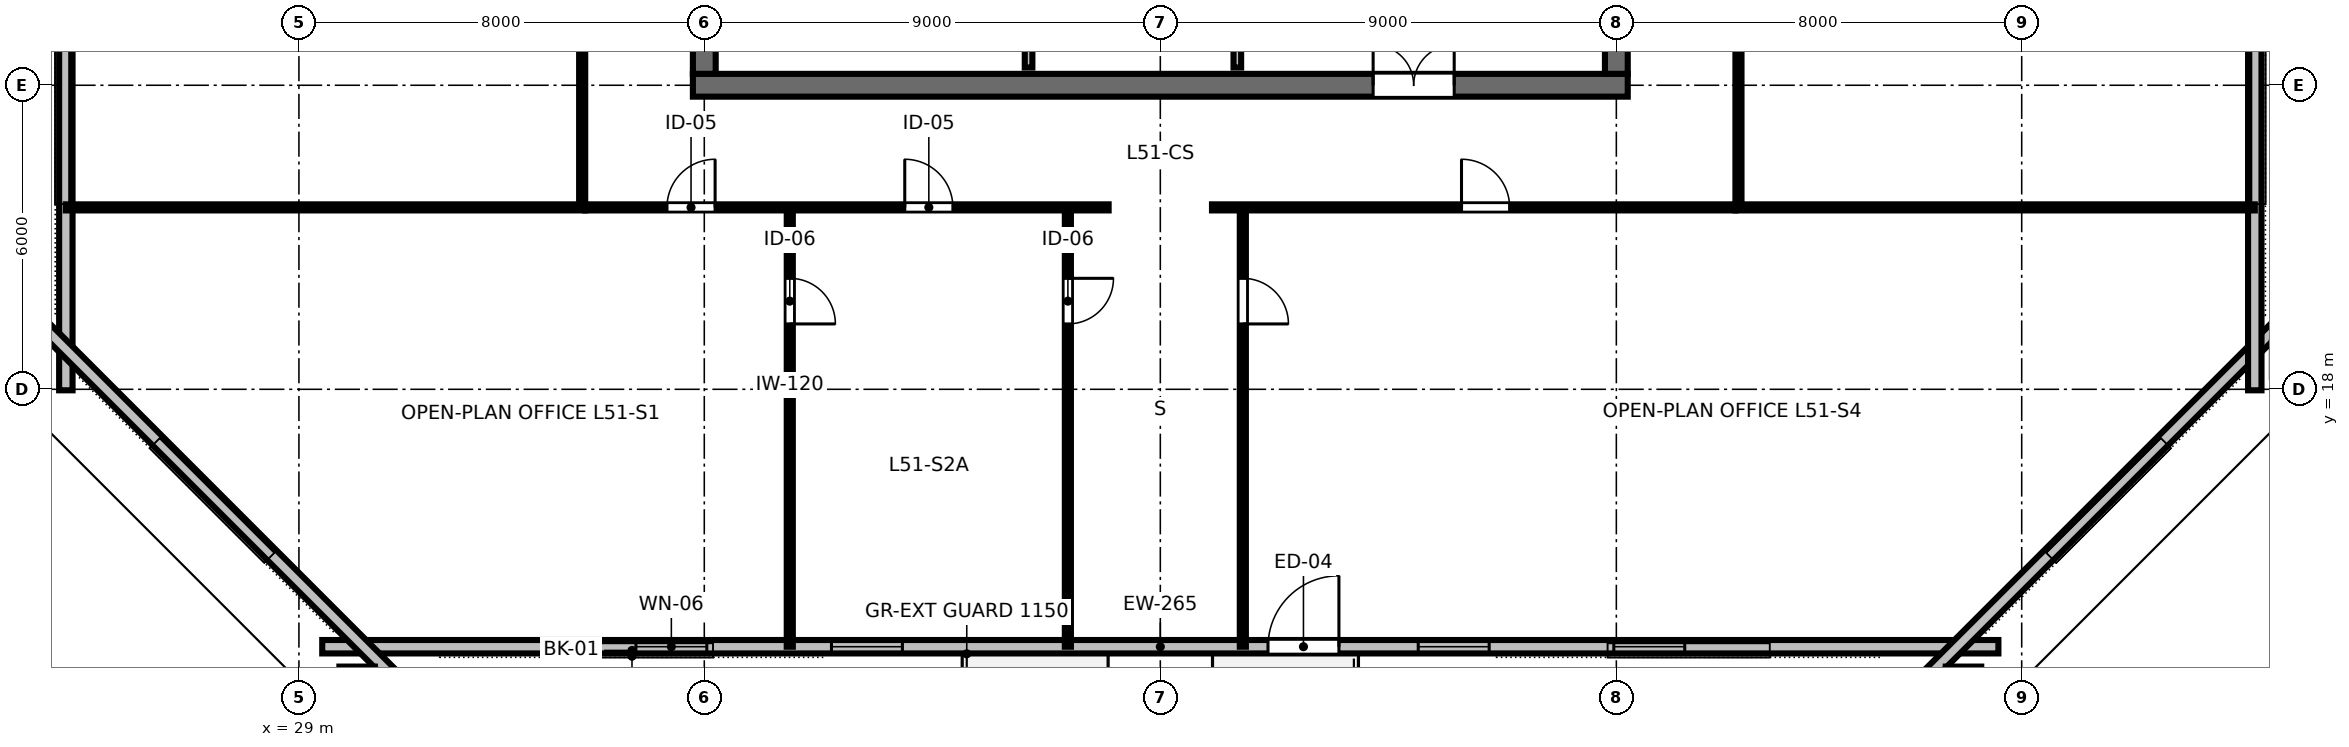
"""IFC4 building model, lengths in metres.
Left out: names, types, materials, properties, quantities, classifications, styles, units other than length and angle.
Written with IfcOpenShell. Run it as: python <this file> out.ifc"""

import sys

from ifc_helpers import new_model, si_unit, direction, frame, frame_2d, origin, origin_2d, place, context, subcontext, project, spatial, rectangle, hollow_rectangle, i_section, extrude, element, fill, save


model = new_model("IFC4")
c1 = context("Model", 3, precision=1e-05, world=origin(), true_north=direction((0.0, 1.0)))
c2 = subcontext(c1, "Body", "Model", "MODEL_VIEW")
j1 = project(units=[si_unit("LENGTHUNIT", "METRE"), si_unit("PLANEANGLEUNIT", "RADIAN")], contexts=[c1])
p1 = place(None, origin())
s1 = spatial("IfcSite", under=j1, at=p1, CompositionType="ELEMENT")
p2 = place(p1, origin())
s2 = spatial("IfcBuilding", under=s1, at=p2, CompositionType="ELEMENT")
p3 = place(p2, frame((0.0, 0.0, 195.0)))
s3 = spatial("IfcBuildingStorey", under=s2, at=p3, CompositionType="ELEMENT", Elevation=195.0)
p4 = place(p3, frame((36.775, 24.0, 0.0), z_axis=(0.0, 0.0, 1.0), x_axis=(1.0, 0.0, 0.0)))
e1 = element("IfcWall", 1, at=p4, inside=s3, PredefinedType="SHEAR", context=c2, shape_type="SweptSolid", body=[
    extrude(rectangle(XDim=18.45, YDim=0.45, at=frame_2d((9.225, 0.0))), origin(), (0.0, 0.0, 1.0), 3.36),
])
p5 = place(p4, frame((13.425, 0.0, 0.0)))
e2 = element("IfcOpeningElement", 2, at=p5, cuts=e1, PredefinedType="OPENING", context=c2, shape_type="SweptSolid", body=[
    extrude(rectangle(XDim=1.6, YDim=2.15, at=frame_2d((0.8, 1.075))), frame((0.0, 0.235, 0.0), z_axis=(0.0, -1.0, 0.0), x_axis=(1.0, 0.0, 0.0)), (0.0, 0.0, 1.0), 0.47),
])
p6 = place(p3, frame((37.0, 24.225, 0.0), z_axis=(0.0, 0.0, 1.0), x_axis=(0.0, 1.0, 0.0)))
e3 = element("IfcWall", 3, at=p6, inside=s3, PredefinedType="SHEAR", context=c2, shape_type="SweptSolid", body=[
    extrude(rectangle(XDim=15.55, YDim=0.45, at=frame_2d((7.775, 0.0))), origin(), (0.0, 0.0, 1.0), 3.36),
])
p7 = place(p6, frame((5.3, 0.0, 0.0)))
e4 = element("IfcOpeningElement", 4, at=p7, cuts=e3, PredefinedType="OPENING", context=c2, shape_type="SweptSolid", body=[
    extrude(rectangle(XDim=1.15, YDim=2.15, at=frame_2d((0.575, 1.075))), frame((0.0, 0.235, 0.0), z_axis=(0.0, -1.0, 0.0), x_axis=(1.0, 0.0, 0.0)), (0.0, 0.0, 1.0), 0.47),
])
p8 = place(p3, frame((55.0, 24.225, 0.0), z_axis=(0.0, 0.0, 1.0), x_axis=(0.0, 1.0, 0.0)))
e5 = element("IfcWall", 5, at=p8, inside=s3, PredefinedType="SHEAR", context=c2, shape_type="SweptSolid", body=[
    extrude(rectangle(XDim=15.55, YDim=0.45, at=frame_2d((7.775, 0.0))), origin(), (0.0, 0.0, 1.0), 3.36),
])
p9 = place(p8, frame((5.3, 0.0, 0.0)))
e6 = element("IfcOpeningElement", 6, at=p9, cuts=e5, PredefinedType="OPENING", context=c2, shape_type="SweptSolid", body=[
    extrude(rectangle(XDim=1.15, YDim=2.15, at=frame_2d((0.575, 1.075))), frame((0.0, 0.235, 0.0), z_axis=(0.0, -1.0, 0.0), x_axis=(1.0, 0.0, 0.0)), (0.0, 0.0, 1.0), 0.47),
])
p10 = place(p3, frame((30.149, 12.103, 0.0), z_axis=(0.251481665301, 0.187288203866, 0.949568376006), x_axis=(-0.597296145547, 0.802020769379, 0.0)))
e7 = element("IfcColumn", 7, at=p10, inside=s3, PredefinedType="COLUMN", context=c2, shape_type="SweptSolid", body=[
    extrude(hollow_rectangle(XDim=0.7, YDim=0.85, WallThickness=0.04, at=origin_2d()), origin(), (0.0, 0.0, 1.0), 3.552),
])
p11 = place(p3, frame((46.0, 12.26, 0.0), z_axis=(0.0, 0.192002682774, 0.981394400742), x_axis=(-1.0, 0.0, 0.0)))
e8 = element("IfcColumn", 8, at=p11, inside=s3, PredefinedType="COLUMN", context=c2, shape_type="SweptSolid", body=[
    extrude(i_section(OverallWidth=0.401, OverallDepth=0.399, WebThickness=0.025, FlangeThickness=0.04, FilletRadius=0.025, at=origin_2d()), origin(), (0.0, 0.0, 1.0), 3.437),
])
p12 = place(p3, frame((61.851, 12.103, 0.0), z_axis=(-0.251481665301, 0.187288203866, 0.949568376006), x_axis=(-0.597296145547, -0.802020769379, 0.0)))
e9 = element("IfcColumn", 9, at=p12, inside=s3, PredefinedType="COLUMN", context=c2, shape_type="SweptSolid", body=[
    extrude(hollow_rectangle(XDim=0.7, YDim=0.85, WallThickness=0.04, at=origin_2d()), origin(), (0.0, 0.0, 1.0), 3.552),
])
for number, where, z_axis, x_axis in (
    (10, (68.363, 18.59, 0.0), (-0.221, 0.218, 0.951), (0.677, -0.668, 0.31)),
    (11, (23.637, 18.59, 0.0), (0.221, 0.218, 0.951), (-0.677, -0.668, 0.31)),
):
    element("IfcColumn", number, at=place(p3, frame(where, z_axis=z_axis, x_axis=x_axis)), inside=s3, PredefinedType="COLUMN", context=c2, shape_type="SweptSolid", body=[
        extrude(hollow_rectangle(XDim=0.7, YDim=0.85, WallThickness=0.04, at=origin_2d()), origin(), (0.0, 0.0, 1.0), 3.548),
    ])
p13 = place(p3, frame((29.46, 12.92, 0.0), z_axis=(0.0, 0.0, 1.0), x_axis=(1.0, 0.0, 0.0)))
e12 = element("IfcWall", 12, at=p13, inside=s3, PredefinedType="STANDARD", context=c2, shape_type="SweptSolid", body=[
    extrude(rectangle(XDim=33.08, YDim=0.265, at=frame_2d((16.54, 0.0))), origin(), (0.0, 0.0, 1.0), 2.832),
])
p14 = place(p13, frame((18.665, 0.0, 0.0)))
e13 = element("IfcOpeningElement", 13, at=p14, cuts=e12, PredefinedType="OPENING", context=c2, shape_type="SweptSolid", body=[
    extrude(rectangle(XDim=1.4, YDim=2.15, at=frame_2d((0.7, 1.075))), frame((0.0, 0.142, 0.0), z_axis=(0.0, -1.0, 0.0), x_axis=(1.0, 0.0, 0.0)), (0.0, 0.0, 1.0), 0.285),
])
p15 = place(p13, frame((6.19, 0.0, 0.85)))
e14 = element("IfcOpeningElement", 14, at=p15, cuts=e12, PredefinedType="OPENING", context=c2, shape_type="SweptSolid", body=[
    extrude(rectangle(XDim=1.4, YDim=1.2, at=frame_2d((0.7, 0.6))), frame((0.0, 0.142, 0.0), z_axis=(0.0, -1.0, 0.0), x_axis=(1.0, 0.0, 0.0)), (0.0, 0.0, 1.0), 0.285),
])
p16 = place(p13, frame((10.05, 0.0, 0.85)))
e15 = element("IfcOpeningElement", 15, at=p16, cuts=e12, PredefinedType="OPENING", context=c2, shape_type="SweptSolid", body=[
    extrude(rectangle(XDim=1.4, YDim=1.2, at=frame_2d((0.7, 0.6))), frame((0.0, 0.142, 0.0), z_axis=(0.0, -1.0, 0.0), x_axis=(1.0, 0.0, 0.0)), (0.0, 0.0, 1.0), 0.285),
])
p17 = place(p13, frame((21.63, 0.0, 0.85)))
e16 = element("IfcOpeningElement", 16, at=p17, cuts=e12, PredefinedType="OPENING", context=c2, shape_type="SweptSolid", body=[
    extrude(rectangle(XDim=1.4, YDim=1.2, at=frame_2d((0.7, 0.6))), frame((0.0, 0.142, 0.0), z_axis=(0.0, -1.0, 0.0), x_axis=(1.0, 0.0, 0.0)), (0.0, 0.0, 1.0), 0.285),
])
p18 = place(p13, frame((25.49, 0.0, 0.85)))
e17 = element("IfcOpeningElement", 17, at=p18, cuts=e12, PredefinedType="OPENING", context=c2, shape_type="SweptSolid", body=[
    extrude(rectangle(XDim=1.4, YDim=1.2, at=frame_2d((0.7, 0.6))), frame((0.0, 0.142, 0.0), z_axis=(0.0, -1.0, 0.0), x_axis=(1.0, 0.0, 0.0)), (0.0, 0.0, 1.0), 0.285),
])
p19 = place(p3, frame((61.155, 12.346, 0.0), z_axis=(0.0, 0.0, 1.0), x_axis=(0.707106781187, 0.707106781187, 0.0)))
e18 = element("IfcWall", 18, at=p19, inside=s3, PredefinedType="STANDARD", context=c2, shape_type="SweptSolid", body=[
    extrude(rectangle(XDim=9.927, YDim=0.265, at=frame_2d((4.963, 0.0))), origin(), (0.0, 0.0, 1.0), 3.375),
])
for number, where, z_axis, x_axis in (
    (19, (67.6, 17.98, 0.0), (0.0, 0.0, 1.0), (0.0, 1.0, 0.0)),
    (20, (24.4, 46.02, 0.0), (0.0, 0.0, 1.0), (0.0, -1.0, 0.0)),
):
    element("IfcWall", number, at=place(p3, frame(where, z_axis=z_axis, x_axis=x_axis)), inside=s3, PredefinedType="STANDARD", context=c2, shape_type="SweptSolid", body=[
        extrude(rectangle(XDim=28.04, YDim=0.265, at=frame_2d((14.02, 0.0))), origin(), (0.0, 0.0, 1.0), 2.832),
    ])
p20 = place(p3, frame((23.826, 19.365, 0.0), z_axis=(0.0, 0.0, 1.0), x_axis=(0.707106781187, -0.707106781187, 0.0)))
e21 = element("IfcWall", 21, at=p20, inside=s3, PredefinedType="STANDARD", context=c2, shape_type="SweptSolid", body=[
    extrude(rectangle(XDim=9.927, YDim=0.265, at=frame_2d((4.963, 0.0))), origin(), (0.0, 0.0, 1.0), 3.375),
])
p21 = place(p3, frame((43.4, 24.35, 0.0), z_axis=(0.0, 0.0, 1.0), x_axis=(0.0, 1.0, 0.0)))
e22 = element("IfcWall", 22, at=p21, inside=s3, PredefinedType="PARTITIONING", context=c2, shape_type="SweptSolid", body=[
    extrude(rectangle(XDim=3.9, YDim=0.15, at=frame_2d((1.95, 0.0))), origin(), (0.0, 0.0, 1.0), 3.375),
])
p22 = place(p21, frame((1.5, 0.0, 0.0)))
e23 = element("IfcOpeningElement", 23, at=p22, cuts=e22, PredefinedType="OPENING", context=c2, shape_type="SweptSolid", body=[
    extrude(rectangle(XDim=0.9, YDim=2.15, at=frame_2d((0.45, 1.075))), frame((0.0, 0.085, 0.0), z_axis=(0.0, -1.0, 0.0), x_axis=(1.0, 0.0, 0.0)), (0.0, 0.0, 1.0), 0.17),
])
p23 = place(p3, frame((47.52, 24.35, 0.0), z_axis=(0.0, 0.0, 1.0), x_axis=(0.0, 1.0, 0.0)))
e24 = element("IfcWall", 24, at=p23, inside=s3, PredefinedType="PARTITIONING", context=c2, shape_type="SweptSolid", body=[
    extrude(rectangle(XDim=3.9, YDim=0.15, at=frame_2d((1.95, 0.0))), origin(), (0.0, 0.0, 1.0), 3.375),
])
p24 = place(p23, frame((0.35, 0.0, 0.0)))
e25 = element("IfcOpeningElement", 25, at=p24, cuts=e24, PredefinedType="OPENING", context=c2, shape_type="SweptSolid", body=[
    extrude(rectangle(XDim=0.9, YDim=2.15, at=frame_2d((0.45, 1.075))), frame((0.0, 0.085, 0.0), z_axis=(0.0, -1.0, 0.0), x_axis=(1.0, 0.0, 0.0)), (0.0, 0.0, 1.0), 0.17),
])
p25 = place(p3, frame((38.687, 21.59, 0.0), z_axis=(0.0, 0.0, 1.0), x_axis=(0.0, -1.0, 0.0)))
e26 = element("IfcWall", 26, at=p25, inside=s3, PredefinedType="PARTITIONING", context=c2, shape_type="SweptSolid", body=[
    extrude(rectangle(XDim=8.67, YDim=0.12, at=frame_2d((4.335, 0.0))), origin(), (0.0, 0.0, 1.0), 2.655),
])
p26 = place(p25, frame((1.4, 0.0, 0.0)))
e27 = element("IfcOpeningElement", 27, at=p26, cuts=e26, PredefinedType="OPENING", context=c2, shape_type="SweptSolid", body=[
    extrude(rectangle(XDim=0.9, YDim=2.15, at=frame_2d((0.45, 1.075))), frame((0.0, 0.07, 0.0), z_axis=(0.0, -1.0, 0.0), x_axis=(1.0, 0.0, 0.0)), (0.0, 0.0, 1.0), 0.14),
])
p27 = place(p3, frame((44.176, 21.59, 0.0), z_axis=(0.0, 0.0, 1.0), x_axis=(0.0, -1.0, 0.0)))
e28 = element("IfcWall", 28, at=p27, inside=s3, PredefinedType="PARTITIONING", context=c2, shape_type="SweptSolid", body=[
    extrude(rectangle(XDim=8.67, YDim=0.12, at=frame_2d((4.335, 0.0))), origin(), (0.0, 0.0, 1.0), 2.655),
])
p28 = place(p27, frame((1.4, 0.0, 0.0)))
e29 = element("IfcOpeningElement", 29, at=p28, cuts=e28, PredefinedType="OPENING", context=c2, shape_type="SweptSolid", body=[
    extrude(rectangle(XDim=0.9, YDim=2.15, at=frame_2d((0.45, 1.075))), frame((0.0, 0.07, 0.0), z_axis=(0.0, -1.0, 0.0), x_axis=(1.0, 0.0, 0.0)), (0.0, 0.0, 1.0), 0.14),
])
p29 = place(p3, frame((47.629, 21.59, 0.0), z_axis=(0.0, 0.0, 1.0), x_axis=(0.0, -1.0, 0.0)))
e30 = element("IfcWall", 30, at=p29, inside=s3, PredefinedType="PARTITIONING", context=c2, shape_type="SweptSolid", body=[
    extrude(rectangle(XDim=8.67, YDim=0.12, at=frame_2d((4.335, 0.0))), origin(), (0.0, 0.0, 1.0), 2.655),
])
p30 = place(p29, frame((1.4, 0.0, 0.0)))
e31 = element("IfcOpeningElement", 31, at=p30, cuts=e30, PredefinedType="OPENING", context=c2, shape_type="SweptSolid", body=[
    extrude(rectangle(XDim=0.9, YDim=2.15, at=frame_2d((0.45, 1.075))), frame((0.0, 0.07, 0.0), z_axis=(0.0, -1.0, 0.0), x_axis=(1.0, 0.0, 0.0)), (0.0, 0.0, 1.0), 0.14),
])
p31 = place(p3, frame((34.65, 21.59, 0.0), z_axis=(0.0, 0.0, 1.0), x_axis=(1.0, 0.0, 0.0)))
e32 = element("IfcWall", 32, at=p31, inside=s3, PredefinedType="PARTITIONING", context=c2, shape_type="SweptSolid", body=[
    extrude(rectangle(XDim=10.33, YDim=0.12, at=frame_2d((5.165, 0.0))), origin(), (0.0, 0.0, 1.0), 2.655),
])
p32 = place(p31, frame((1.614, 0.0, 0.0)))
e33 = element("IfcOpeningElement", 33, at=p32, cuts=e32, PredefinedType="OPENING", context=c2, shape_type="SweptSolid", body=[
    extrude(rectangle(XDim=0.95, YDim=2.15, at=frame_2d((0.475, 1.075))), frame((0.0, 0.07, 0.0), z_axis=(0.0, -1.0, 0.0), x_axis=(1.0, 0.0, 0.0)), (0.0, 0.0, 1.0), 0.14),
])
p33 = place(p31, frame((6.306, 0.0, 0.0)))
e34 = element("IfcOpeningElement", 34, at=p33, cuts=e32, PredefinedType="OPENING", context=c2, shape_type="SweptSolid", body=[
    extrude(rectangle(XDim=0.95, YDim=2.15, at=frame_2d((0.475, 1.075))), frame((0.0, 0.07, 0.0), z_axis=(0.0, -1.0, 0.0), x_axis=(1.0, 0.0, 0.0)), (0.0, 0.0, 1.0), 0.14),
])
p34 = place(p3, frame((47.02, 21.59, 0.0), z_axis=(0.0, 0.0, 1.0), x_axis=(1.0, 0.0, 0.0)))
e35 = element("IfcWall", 35, at=p34, inside=s3, PredefinedType="PARTITIONING", context=c2, shape_type="SweptSolid", body=[
    extrude(rectangle(XDim=10.33, YDim=0.12, at=frame_2d((5.165, 0.0))), origin(), (0.0, 0.0, 1.0), 2.655),
])
p35 = place(p34, frame((4.924, 0.0, 0.0)))
e36 = element("IfcOpeningElement", 36, at=p35, cuts=e35, PredefinedType="OPENING", context=c2, shape_type="SweptSolid", body=[
    extrude(rectangle(XDim=0.95, YDim=2.15, at=frame_2d((0.475, 1.075))), frame((0.0, 0.07, 0.0), z_axis=(0.0, -1.0, 0.0), x_axis=(1.0, 0.0, 0.0)), (0.0, 0.0, 1.0), 0.14),
])
p36 = place(p3, frame((34.59, 21.65, 0.0), z_axis=(0.0, 0.0, 1.0), x_axis=(0.0, 1.0, 0.0)))
e37 = element("IfcWall", 37, at=p36, inside=s3, PredefinedType="PARTITIONING", context=c2, shape_type="SweptSolid", body=[
    extrude(rectangle(XDim=20.7, YDim=0.12, at=frame_2d((10.35, 0.0))), origin(), (0.0, 0.0, 1.0), 2.655),
])
p37 = place(p36, frame((6.214, 0.0, 0.0)))
e38 = element("IfcOpeningElement", 38, at=p37, cuts=e37, PredefinedType="OPENING", context=c2, shape_type="SweptSolid", body=[
    extrude(rectangle(XDim=0.95, YDim=2.15, at=frame_2d((0.475, 1.075))), frame((0.0, 0.07, 0.0), z_axis=(0.0, -1.0, 0.0), x_axis=(1.0, 0.0, 0.0)), (0.0, 0.0, 1.0), 0.14),
])
p38 = place(p36, frame((16.365, 0.0, 0.0)))
e39 = element("IfcOpeningElement", 39, at=p38, cuts=e37, PredefinedType="OPENING", context=c2, shape_type="SweptSolid", body=[
    extrude(rectangle(XDim=0.95, YDim=2.15, at=frame_2d((0.475, 1.075))), frame((0.0, 0.07, 0.0), z_axis=(0.0, -1.0, 0.0), x_axis=(1.0, 0.0, 0.0)), (0.0, 0.0, 1.0), 0.14),
])
p39 = place(p3, frame((57.41, 21.65, 0.0), z_axis=(0.0, 0.0, 1.0), x_axis=(0.0, 1.0, 0.0)))
e40 = element("IfcWall", 40, at=p39, inside=s3, PredefinedType="PARTITIONING", context=c2, shape_type="SweptSolid", body=[
    extrude(rectangle(XDim=20.7, YDim=0.12, at=frame_2d((10.35, 0.0))), origin(), (0.0, 0.0, 1.0), 2.655),
])
p40 = place(p39, frame((9.875, 0.0, 0.0)))
e41 = element("IfcOpeningElement", 41, at=p40, cuts=e40, PredefinedType="OPENING", context=c2, shape_type="SweptSolid", body=[
    extrude(rectangle(XDim=0.95, YDim=2.15, at=frame_2d((0.475, 1.075))), frame((0.0, 0.07, 0.0), z_axis=(0.0, -1.0, 0.0), x_axis=(1.0, 0.0, 0.0)), (0.0, 0.0, 1.0), 0.14),
])
for number, where, z_axis, x_axis in (
    (42, (34.65, 21.59, 0.0), (0.0, 0.0, 1.0), (-1.0, 0.0, 0.0)),
    (43, (57.35, 21.59, 0.0), (0.0, 0.0, 1.0), (1.0, 0.0, 0.0)),
):
    element("IfcWall", number, at=place(p3, frame(where, z_axis=z_axis, x_axis=x_axis)), inside=s3, PredefinedType="PARTITIONING", context=c2, shape_type="SweptSolid", body=[
        extrude(rectangle(XDim=10.25, YDim=0.12, at=frame_2d((5.125, 0.0))), origin(), (0.0, 0.0, 1.0), 2.655),
    ])
p41 = place(p14, origin())
e44 = element("IfcDoor", 44, at=p41, inside=s3, OperationType="SINGLE_SWING_RIGHT", PredefinedType="DOOR", context=c2, shape_type="SweptSolid", body=[
    extrude(rectangle(XDim=1.4, YDim=2.15, at=frame_2d((0.7, 1.075))), frame((0.0, 0.025, 0.0), z_axis=(0.0, -1.0, 0.0), x_axis=(1.0, 0.0, 0.0)), (0.0, 0.0, 1.0), 0.05),
])
fill(e13, e44)
p42 = place(p15, origin())
e45 = element("IfcWindow", 45, at=p42, inside=s3, PartitioningType="SINGLE_PANEL", PredefinedType="WINDOW", context=c2, shape_type="SweptSolid", body=[
    extrude(rectangle(XDim=1.4, YDim=1.2, at=frame_2d((0.7, 0.6))), frame((0.0, 0.03, 0.0), z_axis=(0.0, -1.0, 0.0), x_axis=(1.0, 0.0, 0.0)), (0.0, 0.0, 1.0), 0.06),
])
fill(e14, e45)
p43 = place(p16, origin())
e46 = element("IfcWindow", 46, at=p43, inside=s3, PartitioningType="SINGLE_PANEL", PredefinedType="WINDOW", context=c2, shape_type="SweptSolid", body=[
    extrude(rectangle(XDim=1.4, YDim=1.2, at=frame_2d((0.7, 0.6))), frame((0.0, 0.03, 0.0), z_axis=(0.0, -1.0, 0.0), x_axis=(1.0, 0.0, 0.0)), (0.0, 0.0, 1.0), 0.06),
])
fill(e15, e46)
p44 = place(p17, origin())
e47 = element("IfcWindow", 47, at=p44, inside=s3, PartitioningType="SINGLE_PANEL", PredefinedType="WINDOW", context=c2, shape_type="SweptSolid", body=[
    extrude(rectangle(XDim=1.4, YDim=1.2, at=frame_2d((0.7, 0.6))), frame((0.0, 0.03, 0.0), z_axis=(0.0, -1.0, 0.0), x_axis=(1.0, 0.0, 0.0)), (0.0, 0.0, 1.0), 0.06),
])
fill(e16, e47)
p45 = place(p18, origin())
e48 = element("IfcWindow", 48, at=p45, inside=s3, PartitioningType="SINGLE_PANEL", PredefinedType="WINDOW", context=c2, shape_type="SweptSolid", body=[
    extrude(rectangle(XDim=1.4, YDim=1.2, at=frame_2d((0.7, 0.6))), frame((0.0, 0.03, 0.0), z_axis=(0.0, -1.0, 0.0), x_axis=(1.0, 0.0, 0.0)), (0.0, 0.0, 1.0), 0.06),
])
fill(e17, e48)
p46 = place(p5, origin())
e49 = element("IfcDoor", 49, at=p46, inside=s3, OperationType="DOUBLE_DOOR_SINGLE_SWING", PredefinedType="DOOR", context=c2, shape_type="SweptSolid", body=[
    extrude(rectangle(XDim=1.6, YDim=2.15, at=frame_2d((0.8, 1.075))), frame((0.0, 0.025, 0.0), z_axis=(0.0, -1.0, 0.0), x_axis=(1.0, 0.0, 0.0)), (0.0, 0.0, 1.0), 0.05),
])
fill(e2, e49)
p47 = place(p26, origin())
e50 = element("IfcDoor", 50, at=p47, inside=s3, OperationType="SINGLE_SWING_RIGHT", PredefinedType="DOOR", context=c2, shape_type="SweptSolid", body=[
    extrude(rectangle(XDim=0.9, YDim=2.15, at=frame_2d((0.45, 1.075))), frame((0.0, 0.025, 0.0), z_axis=(0.0, -1.0, 0.0), x_axis=(1.0, 0.0, 0.0)), (0.0, 0.0, 1.0), 0.05),
])
fill(e27, e50)
p48 = place(p28, origin())
e51 = element("IfcDoor", 51, at=p48, inside=s3, OperationType="SINGLE_SWING_LEFT", PredefinedType="DOOR", context=c2, shape_type="SweptSolid", body=[
    extrude(rectangle(XDim=0.9, YDim=2.15, at=frame_2d((0.45, 1.075))), frame((0.0, 0.025, 0.0), z_axis=(0.0, -1.0, 0.0), x_axis=(1.0, 0.0, 0.0)), (0.0, 0.0, 1.0), 0.05),
])
fill(e29, e51)
p49 = place(p30, origin())
e52 = element("IfcDoor", 52, at=p49, inside=s3, OperationType="SINGLE_SWING_RIGHT", PredefinedType="DOOR", context=c2, shape_type="SweptSolid", body=[
    extrude(rectangle(XDim=0.9, YDim=2.15, at=frame_2d((0.45, 1.075))), frame((0.0, 0.025, 0.0), z_axis=(0.0, -1.0, 0.0), x_axis=(1.0, 0.0, 0.0)), (0.0, 0.0, 1.0), 0.05),
])
fill(e31, e52)
p50 = place(p32, origin())
e53 = element("IfcDoor", 53, at=p50, inside=s3, OperationType="SINGLE_SWING_RIGHT", PredefinedType="DOOR", context=c2, shape_type="SweptSolid", body=[
    extrude(rectangle(XDim=0.95, YDim=2.15, at=frame_2d((0.475, 1.075))), frame((0.0, 0.025, 0.0), z_axis=(0.0, -1.0, 0.0), x_axis=(1.0, 0.0, 0.0)), (0.0, 0.0, 1.0), 0.05),
])
fill(e33, e53)
p51 = place(p33, origin())
e54 = element("IfcDoor", 54, at=p51, inside=s3, OperationType="SINGLE_SWING_LEFT", PredefinedType="DOOR", context=c2, shape_type="SweptSolid", body=[
    extrude(rectangle(XDim=0.95, YDim=2.15, at=frame_2d((0.475, 1.075))), frame((0.0, 0.025, 0.0), z_axis=(0.0, -1.0, 0.0), x_axis=(1.0, 0.0, 0.0)), (0.0, 0.0, 1.0), 0.05),
])
fill(e34, e54)
p52 = place(p35, origin())
e55 = element("IfcDoor", 55, at=p52, inside=s3, OperationType="SINGLE_SWING_LEFT", PredefinedType="DOOR", context=c2, shape_type="SweptSolid", body=[
    extrude(rectangle(XDim=0.95, YDim=2.15, at=frame_2d((0.475, 1.075))), frame((0.0, 0.025, 0.0), z_axis=(0.0, -1.0, 0.0), x_axis=(1.0, 0.0, 0.0)), (0.0, 0.0, 1.0), 0.05),
])
fill(e36, e55)
save(model, sys.argv[1])
